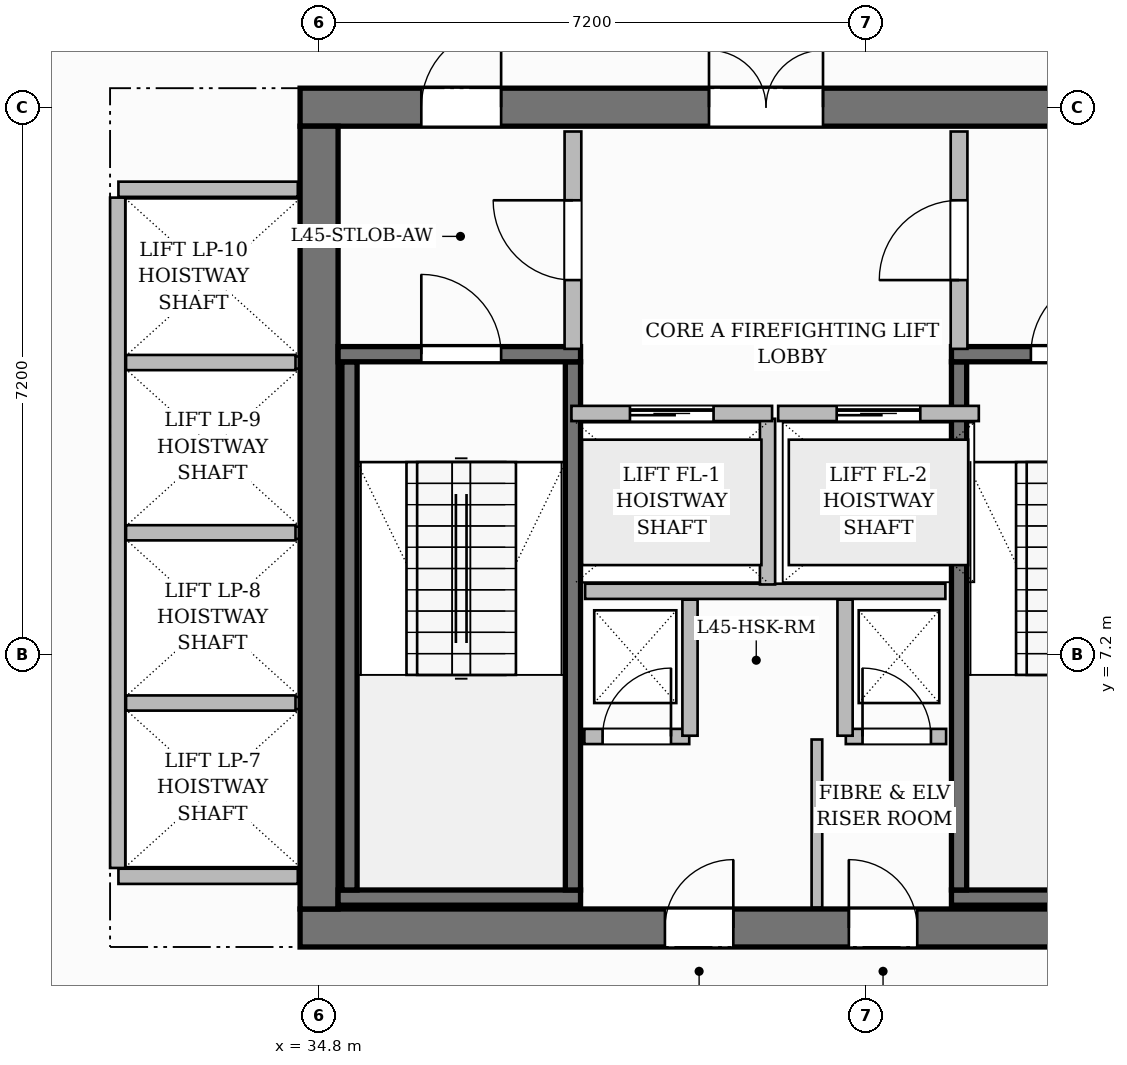
"""IFC4 building model, lengths in metres.
Left out: names, types, materials, properties, quantities, classifications, styles, units other than length and angle.
Written with IfcOpenShell. Run it as: python <this file> out.ifc"""

import sys

from ifc_helpers import new_model, si_unit, direction, frame, frame_2d, origin, place, context, subcontext, project, spatial, rectangle, extrude, source, transform, mapped, element, fill, save


model = new_model("IFC4")
c1 = context("Model", 3, precision=1e-05, world=origin(), true_north=direction((0.0, 1.0)))
c2 = subcontext(c1, "Body", "Model", "MODEL_VIEW")
j1 = project(units=[si_unit("LENGTHUNIT", "METRE"), si_unit("PLANEANGLEUNIT", "RADIAN")], contexts=[c1])
p1 = place(None, origin())
s1 = spatial("IfcSite", under=j1, at=p1, CompositionType="ELEMENT")
p2 = place(p1, origin())
s2 = spatial("IfcBuilding", under=s1, at=p2, CompositionType="ELEMENT")
p3 = place(p2, frame((0.0, 0.0, 181.1)))
s3 = spatial("IfcBuildingStorey", under=s2, at=p3, CompositionType="ELEMENT", Elevation=181.1)
p4 = place(p3, frame((34.55, 3.6, 0.0), z_axis=(0.0, 0.0, 1.0), x_axis=(1.0, 0.0, 0.0)))
e1 = element("IfcWall", 1, at=p4, inside=s3, PredefinedType="SHEAR", context=c2, shape_type="SweptSolid", body=[
    extrude(rectangle(XDim=15.5, YDim=0.5, at=frame_2d((7.75, 0.0))), origin(), (0.0, 0.0, 1.0), 3.85),
])
p5 = place(p4, frame((4.8, 0.0, 0.0)))
e2 = element("IfcOpeningElement", 2, at=p5, cuts=e1, PredefinedType="OPENING", context=c2, shape_type="SweptSolid", body=[
    extrude(rectangle(XDim=0.9, YDim=2.1, at=frame_2d((0.45, 1.05))), frame((0.0, 0.26, 0.0), z_axis=(0.0, -1.0, 0.0), x_axis=(1.0, 0.0, 0.0)), (0.0, 0.0, 1.0), 0.52),
])
p6 = place(p4, frame((7.22, 0.0, 0.0)))
e3 = element("IfcOpeningElement", 3, at=p6, cuts=e1, PredefinedType="OPENING", context=c2, shape_type="SweptSolid", body=[
    extrude(rectangle(XDim=0.9, YDim=2.1, at=frame_2d((0.45, 1.05))), frame((0.0, 0.26, 0.0), z_axis=(0.0, -1.0, 0.0), x_axis=(1.0, 0.0, 0.0)), (0.0, 0.0, 1.0), 0.52),
])
p7 = place(p3, frame((34.55, 14.4, 0.0), z_axis=(0.0, 0.0, 1.0), x_axis=(1.0, 0.0, 0.0)))
e4 = element("IfcWall", 4, at=p7, inside=s3, PredefinedType="SHEAR", context=c2, shape_type="SweptSolid", body=[
    extrude(rectangle(XDim=15.5, YDim=0.5, at=frame_2d((7.75, 0.0))), origin(), (0.0, 0.0, 1.0), 3.85),
])
p8 = place(p7, frame((5.38, 0.0, 0.0)))
e5 = element("IfcOpeningElement", 5, at=p8, cuts=e4, PredefinedType="OPENING", context=c2, shape_type="SweptSolid", body=[
    extrude(rectangle(XDim=1.5, YDim=2.2, at=frame_2d((0.75, 1.1))), frame((0.0, 0.26, 0.0), z_axis=(0.0, -1.0, 0.0), x_axis=(1.0, 0.0, 0.0)), (0.0, 0.0, 1.0), 0.52),
])
p9 = place(p7, frame((1.595, 0.0, 0.0)))
e6 = element("IfcOpeningElement", 6, at=p9, cuts=e4, PredefinedType="OPENING", context=c2, shape_type="SweptSolid", body=[
    extrude(rectangle(XDim=1.05, YDim=2.15, at=frame_2d((0.525, 1.075))), frame((0.0, 0.26, 0.0), z_axis=(0.0, -1.0, 0.0), x_axis=(1.0, 0.0, 0.0)), (0.0, 0.0, 1.0), 0.52),
])
p10 = place(p7, frame((11.225, 0.0, 0.0)))
e7 = element("IfcOpeningElement", 7, at=p10, cuts=e4, PredefinedType="OPENING", context=c2, shape_type="SweptSolid", body=[
    extrude(rectangle(XDim=1.05, YDim=2.15, at=frame_2d((0.525, 1.075))), frame((0.0, 0.26, 0.0), z_axis=(0.0, -1.0, 0.0), x_axis=(1.0, 0.0, 0.0)), (0.0, 0.0, 1.0), 0.52),
])
p11 = place(p3, frame((34.8, 3.85, 0.0), z_axis=(0.0, 0.0, 1.0), x_axis=(0.0, 1.0, 0.0)))
e8 = element("IfcWall", 8, at=p11, inside=s3, PredefinedType="SHEAR", context=c2, shape_type="SweptSolid", body=[
    extrude(rectangle(XDim=10.3, YDim=0.5, at=frame_2d((5.15, 0.0))), origin(), (0.0, 0.0, 1.0), 3.85),
])
p12 = place(p3, frame((35.05, 4.0, 0.0), z_axis=(0.0, 0.0, 1.0), x_axis=(1.0, 0.0, 0.0)))
e9 = element("IfcWall", 9, at=p12, inside=s3, PredefinedType="SHEAR", context=c2, shape_type="SweptSolid", body=[
    extrude(rectangle(XDim=3.19, YDim=0.2, at=frame_2d((1.595, 0.0))), origin(), (0.0, 0.0, 1.0), 3.85),
])
for number, where, z_axis, x_axis in (
    (10, (35.2, 4.1, 0.0), (0.0, 0.0, 1.0), (0.0, 1.0, 0.0)),
    (11, (38.14, 4.1, 0.0), (0.0, 0.0, 1.0), (0.0, 1.0, 0.0)),
):
    element("IfcWall", number, at=place(p3, frame(where, z_axis=z_axis, x_axis=x_axis)), inside=s3, PredefinedType="SHEAR", context=c2, shape_type="SweptSolid", body=[
        extrude(rectangle(XDim=6.95, YDim=0.2, at=frame_2d((3.475, 0.0))), origin(), (0.0, 0.0, 1.0), 3.85),
    ])
p13 = place(p3, frame((35.05, 11.15, 0.0), z_axis=(0.0, 0.0, 1.0), x_axis=(1.0, 0.0, 0.0)))
e12 = element("IfcWall", 12, at=p13, inside=s3, PredefinedType="SHEAR", context=c2, shape_type="SweptSolid", body=[
    extrude(rectangle(XDim=3.19, YDim=0.2, at=frame_2d((1.595, 0.0))), origin(), (0.0, 0.0, 1.0), 3.85),
])
p14 = place(p13, frame((1.095, 0.0, 0.0)))
e13 = element("IfcOpeningElement", 13, at=p14, cuts=e12, PredefinedType="OPENING", context=c2, shape_type="SweptSolid", body=[
    extrude(rectangle(XDim=1.05, YDim=2.2, at=frame_2d((0.525, 1.1))), frame((0.0, 0.11, 0.0), z_axis=(0.0, -1.0, 0.0), x_axis=(1.0, 0.0, 0.0)), (0.0, 0.0, 1.0), 0.22),
])
p15 = place(p3, frame((43.12, 4.0, 0.0), z_axis=(0.0, 0.0, 1.0), x_axis=(1.0, 0.0, 0.0)))
e14 = element("IfcWall", 14, at=p15, inside=s3, PredefinedType="SHEAR", context=c2, shape_type="SweptSolid", body=[
    extrude(rectangle(XDim=6.43, YDim=0.2, at=frame_2d((3.215, 0.0))), origin(), (0.0, 0.0, 1.0), 3.85),
])
p16 = place(p3, frame((43.22, 4.1, 0.0), z_axis=(0.0, 0.0, 1.0), x_axis=(0.0, 1.0, 0.0)))
e15 = element("IfcWall", 15, at=p16, inside=s3, PredefinedType="SHEAR", context=c2, shape_type="SweptSolid", body=[
    extrude(rectangle(XDim=6.95, YDim=0.2, at=frame_2d((3.475, 0.0))), origin(), (0.0, 0.0, 1.0), 3.85),
])
p17 = place(p3, frame((43.12, 11.15, 0.0), z_axis=(0.0, 0.0, 1.0), x_axis=(1.0, 0.0, 0.0)))
e16 = element("IfcWall", 16, at=p17, inside=s3, PredefinedType="SHEAR", context=c2, shape_type="SweptSolid", body=[
    extrude(rectangle(XDim=6.43, YDim=0.2, at=frame_2d((3.215, 0.0))), origin(), (0.0, 0.0, 1.0), 3.85),
])
p18 = place(p17, frame((1.045, 0.0, 0.0)))
e17 = element("IfcOpeningElement", 17, at=p18, cuts=e16, PredefinedType="OPENING", context=c2, shape_type="SweptSolid", body=[
    extrude(rectangle(XDim=1.05, YDim=2.2, at=frame_2d((0.525, 1.1))), frame((0.0, 0.11, 0.0), z_axis=(0.0, -1.0, 0.0), x_axis=(1.0, 0.0, 0.0)), (0.0, 0.0, 1.0), 0.22),
])
p19 = place(p17, frame((4.125, 0.0, 0.0)))
e18 = element("IfcOpeningElement", 18, at=p19, cuts=e16, PredefinedType="OPENING", context=c2, shape_type="SweptSolid", body=[
    extrude(rectangle(XDim=1.05, YDim=2.2, at=frame_2d((0.525, 1.1))), frame((0.0, 0.11, 0.0), z_axis=(0.0, -1.0, 0.0), x_axis=(1.0, 0.0, 0.0)), (0.0, 0.0, 1.0), 0.22),
])
p20 = place(p3, frame((38.3, 8.03, 0.0), z_axis=(0.0, 0.0, 1.0), x_axis=(1.0, 0.0, 0.0)))
e19 = element("IfcWall", 19, at=p20, inside=s3, PredefinedType="PARTITIONING", context=c2, shape_type="SweptSolid", body=[
    extrude(rectangle(XDim=4.74, YDim=0.2, at=frame_2d((2.37, 0.0))), origin(), (0.0, 0.0, 1.0), 3.6),
])
p21 = place(p3, frame((40.7, 8.12, 0.0), z_axis=(0.0, 0.0, 1.0), x_axis=(0.0, 1.0, 0.0)))
e20 = element("IfcWall", 20, at=p21, inside=s3, PredefinedType="PARTITIONING", context=c2, shape_type="SweptSolid", body=[
    extrude(rectangle(XDim=2.18, YDim=0.2, at=frame_2d((1.09, 0.0))), origin(), (0.0, 0.0, 1.0), 3.6),
])
p22 = place(p3, frame((38.14, 11.22, 0.0), z_axis=(0.0, 0.0, 1.0), x_axis=(0.0, 1.0, 0.0)))
e21 = element("IfcWall", 21, at=p22, inside=s3, PredefinedType="PARTITIONING", context=c2, shape_type="SweptSolid", body=[
    extrude(rectangle(XDim=2.86, YDim=0.22, at=frame_2d((1.43, 0.0))), origin(), (0.0, 0.0, 1.0), 3.6),
])
p23 = place(p22, frame((0.905, 0.0, 0.0)))
e22 = element("IfcOpeningElement", 22, at=p23, cuts=e21, PredefinedType="OPENING", context=c2, shape_type="SweptSolid", body=[
    extrude(rectangle(XDim=1.05, YDim=2.15, at=frame_2d((0.525, 1.075))), frame((0.0, 0.12, 0.0), z_axis=(0.0, -1.0, 0.0), x_axis=(1.0, 0.0, 0.0)), (0.0, 0.0, 1.0), 0.24),
])
p24 = place(p3, frame((43.22, 11.22, 0.0), z_axis=(0.0, 0.0, 1.0), x_axis=(0.0, 1.0, 0.0)))
e23 = element("IfcWall", 23, at=p24, inside=s3, PredefinedType="PARTITIONING", context=c2, shape_type="SweptSolid", body=[
    extrude(rectangle(XDim=2.86, YDim=0.22, at=frame_2d((1.43, 0.0))), origin(), (0.0, 0.0, 1.0), 3.6),
])
p25 = place(p24, frame((0.905, 0.0, 0.0)))
e24 = element("IfcOpeningElement", 24, at=p25, cuts=e23, PredefinedType="OPENING", context=c2, shape_type="SweptSolid", body=[
    extrude(rectangle(XDim=1.05, YDim=2.15, at=frame_2d((0.525, 1.075))), frame((0.0, 0.12, 0.0), z_axis=(0.0, -1.0, 0.0), x_axis=(1.0, 0.0, 0.0)), (0.0, 0.0, 1.0), 0.24),
])
p26 = place(p3, frame((38.29, 6.12, 0.0), z_axis=(0.0, 0.0, 1.0), x_axis=(1.0, 0.0, 0.0)))
e25 = element("IfcWall", 25, at=p26, inside=s3, PredefinedType="PARTITIONING", context=c2, shape_type="SweptSolid", body=[
    extrude(rectangle(XDim=1.38, YDim=0.2, at=frame_2d((0.69, 0.0))), origin(), (0.0, 0.0, 1.0), 3.6),
])
p27 = place(p26, frame((0.24, 0.0, 0.0)))
e26 = element("IfcOpeningElement", 26, at=p27, cuts=e25, PredefinedType="OPENING", context=c2, shape_type="SweptSolid", body=[
    extrude(rectangle(XDim=0.9, YDim=2.1, at=frame_2d((0.45, 1.05))), frame((0.0, 0.11, 0.0), z_axis=(0.0, -1.0, 0.0), x_axis=(1.0, 0.0, 0.0)), (0.0, 0.0, 1.0), 0.22),
])
p28 = place(p3, frame((39.68, 6.13, 0.0), z_axis=(0.0, 0.0, 1.0), x_axis=(0.0, 1.0, 0.0)))
e27 = element("IfcWall", 27, at=p28, inside=s3, PredefinedType="PARTITIONING", context=c2, shape_type="SweptSolid", body=[
    extrude(rectangle(XDim=1.79, YDim=0.2, at=frame_2d((0.895, 0.0))), origin(), (0.0, 0.0, 1.0), 3.6),
])
p29 = place(p3, frame((41.73, 6.12, 0.0), z_axis=(0.0, 0.0, 1.0), x_axis=(1.0, 0.0, 0.0)))
e28 = element("IfcWall", 28, at=p29, inside=s3, PredefinedType="PARTITIONING", context=c2, shape_type="SweptSolid", body=[
    extrude(rectangle(XDim=1.32, YDim=0.2, at=frame_2d((0.66, 0.0))), origin(), (0.0, 0.0, 1.0), 3.6),
])
p30 = place(p29, frame((0.22, 0.0, 0.0)))
e29 = element("IfcOpeningElement", 29, at=p30, cuts=e28, PredefinedType="OPENING", context=c2, shape_type="SweptSolid", body=[
    extrude(rectangle(XDim=0.9, YDim=2.1, at=frame_2d((0.45, 1.05))), frame((0.0, 0.11, 0.0), z_axis=(0.0, -1.0, 0.0), x_axis=(1.0, 0.0, 0.0)), (0.0, 0.0, 1.0), 0.22),
])
p31 = place(p3, frame((41.72, 6.13, 0.0), z_axis=(0.0, 0.0, 1.0), x_axis=(0.0, 1.0, 0.0)))
e30 = element("IfcWall", 30, at=p31, inside=s3, PredefinedType="PARTITIONING", context=c2, shape_type="SweptSolid", body=[
    extrude(rectangle(XDim=1.79, YDim=0.2, at=frame_2d((0.895, 0.0))), origin(), (0.0, 0.0, 1.0), 3.6),
])
p32 = place(p3, frame((41.35, 3.87, 0.0), z_axis=(0.0, 0.0, 1.0), x_axis=(0.0, 1.0, 0.0)))
e31 = element("IfcWall", 31, at=p32, inside=s3, PredefinedType="PARTITIONING", context=c2, shape_type="SweptSolid", body=[
    extrude(rectangle(XDim=2.21, YDim=0.14, at=frame_2d((1.105, 0.0))), origin(), (0.0, 0.0, 1.0), 3.6),
])
for number, where, z_axis, x_axis in (
    (32, (32.16, 4.28, 0.0), (0.0, 0.0, 1.0), (1.0, 0.0, 0.0)),
    (33, (32.16, 13.32, 0.0), (0.0, 0.0, 1.0), (1.0, 0.0, 0.0)),
):
    element("IfcWall", number, at=place(p3, frame(where, z_axis=z_axis, x_axis=x_axis)), inside=s3, PredefinedType="PARTITIONING", context=c2, shape_type="SweptSolid", body=[
        extrude(rectangle(XDim=2.36, YDim=0.2, at=frame_2d((1.18, 0.0))), origin(), (0.0, 0.0, 1.0), 3.6),
    ])
p33 = place(p3, frame((32.15, 4.39, 0.0), z_axis=(0.0, 0.0, 1.0), x_axis=(0.0, 1.0, 0.0)))
e34 = element("IfcWall", 34, at=p33, inside=s3, PredefinedType="PARTITIONING", context=c2, shape_type="SweptSolid", body=[
    extrude(rectangle(XDim=8.82, YDim=0.2, at=frame_2d((4.41, 0.0))), origin(), (0.0, 0.0, 1.0), 3.6),
])
for number, where, z_axis, x_axis in (
    (35, (32.26, 6.56, 0.0), (0.0, 0.0, 1.0), (1.0, 0.0, 0.0)),
    (36, (32.26, 8.8, 0.0), (0.0, 0.0, 1.0), (1.0, 0.0, 0.0)),
    (37, (32.26, 11.04, 0.0), (0.0, 0.0, 1.0), (1.0, 0.0, 0.0)),
):
    element("IfcWall", number, at=place(p3, frame(where, z_axis=z_axis, x_axis=x_axis)), inside=s3, PredefinedType="PARTITIONING", context=c2, shape_type="SweptSolid", body=[
        extrude(rectangle(XDim=2.23, YDim=0.2, at=frame_2d((1.115, 0.0))), origin(), (0.0, 0.0, 1.0), 3.6),
    ])
p34 = place(p3, frame((38.12, 10.37, 0.0), z_axis=(0.0, 0.0, 1.0), x_axis=(1.0, 0.0, 0.0)))
e38 = element("IfcWall", 38, at=p34, inside=s3, PredefinedType="PARTITIONING", context=c2, shape_type="SweptSolid", body=[
    extrude(rectangle(XDim=2.64, YDim=0.2, at=frame_2d((1.32, 0.0))), origin(), (0.0, 0.0, 1.0), 3.6),
])
p35 = place(p34, frame((0.77, 0.0, 0.0)))
e39 = element("IfcOpeningElement", 39, at=p35, cuts=e38, PredefinedType="OPENING", context=c2, shape_type="SweptSolid", body=[
    extrude(rectangle(XDim=1.1, YDim=2.2, at=frame_2d((0.55, 1.1))), frame((0.0, 0.11, 0.0), z_axis=(0.0, -1.0, 0.0), x_axis=(1.0, 0.0, 0.0)), (0.0, 0.0, 1.0), 0.22),
])
p36 = place(p3, frame((40.84, 10.37, 0.0), z_axis=(0.0, 0.0, 1.0), x_axis=(1.0, 0.0, 0.0)))
e40 = element("IfcWall", 40, at=p36, inside=s3, PredefinedType="PARTITIONING", context=c2, shape_type="SweptSolid", body=[
    extrude(rectangle(XDim=2.64, YDim=0.2, at=frame_2d((1.32, 0.0))), origin(), (0.0, 0.0, 1.0), 3.6),
])
p37 = place(p36, frame((0.77, 0.0, 0.0)))
e41 = element("IfcOpeningElement", 41, at=p37, cuts=e40, PredefinedType="OPENING", context=c2, shape_type="SweptSolid", body=[
    extrude(rectangle(XDim=1.1, YDim=2.2, at=frame_2d((0.55, 1.1))), frame((0.0, 0.11, 0.0), z_axis=(0.0, -1.0, 0.0), x_axis=(1.0, 0.0, 0.0)), (0.0, 0.0, 1.0), 0.22),
])
m1 = source(origin(), c2, "Body", "SweptSolid", [
    extrude(rectangle(XDim=1.05, YDim=2.2, at=frame_2d((0.525, 1.1))), frame((0.0, 0.025, 0.0), z_axis=(0.0, -1.0, 0.0), x_axis=(1.0, 0.0, 0.0)), (0.0, 0.0, 1.0), 0.05),
])
p38 = place(p14, origin())
e42 = element("IfcDoor", 42, at=p38, inside=s3, OperationType="SINGLE_SWING_LEFT", PredefinedType="DOOR", context=c2, shape_type="MappedRepresentation", body=[
    mapped(m1, transform((0.0, 0.0, 0.0), scale=1.0)),
])
fill(e13, e42)
p39 = place(p18, origin())
e43 = element("IfcDoor", 43, at=p39, inside=s3, OperationType="SINGLE_SWING_RIGHT", PredefinedType="DOOR", context=c2, shape_type="MappedRepresentation", body=[
    mapped(m1, transform((0.0, 0.0, 0.0), scale=1.0)),
])
fill(e17, e43)
m2 = source(origin(), c2, "Body", "SweptSolid", [
    extrude(rectangle(XDim=1.05, YDim=2.15, at=frame_2d((0.525, 1.075))), frame((0.0, 0.025, 0.0), z_axis=(0.0, -1.0, 0.0), x_axis=(1.0, 0.0, 0.0)), (0.0, 0.0, 1.0), 0.05),
])
p40 = place(p23, origin())
e44 = element("IfcDoor", 44, at=p40, inside=s3, OperationType="SINGLE_SWING_RIGHT", PredefinedType="DOOR", context=c2, shape_type="MappedRepresentation", body=[
    mapped(m2, transform((0.0, 0.0, 0.0), scale=1.0)),
])
fill(e22, e44)
p41 = place(p25, origin())
e45 = element("IfcDoor", 45, at=p41, inside=s3, OperationType="SINGLE_SWING_LEFT", PredefinedType="DOOR", context=c2, shape_type="MappedRepresentation", body=[
    mapped(m2, transform((0.0, 0.0, 0.0), scale=1.0)),
])
fill(e24, e45)
m3 = source(origin(), c2, "Body", "SweptSolid", [
    extrude(rectangle(XDim=1.5, YDim=2.2, at=frame_2d((0.75, 1.1))), frame((0.0, 0.025, 0.0), z_axis=(0.0, -1.0, 0.0), x_axis=(1.0, 0.0, 0.0)), (0.0, 0.0, 1.0), 0.05),
])
p42 = place(p8, origin())
e46 = element("IfcDoor", 46, at=p42, inside=s3, OperationType="DOUBLE_DOOR_SINGLE_SWING", PredefinedType="DOOR", context=c2, shape_type="MappedRepresentation", body=[
    mapped(m3, transform((0.0, 0.0, 0.0), scale=1.0)),
])
fill(e5, e46)
p43 = place(p9, origin())
e47 = element("IfcDoor", 47, at=p43, inside=s3, OperationType="SINGLE_SWING_RIGHT", PredefinedType="DOOR", context=c2, shape_type="MappedRepresentation", body=[
    mapped(m2, transform((0.0, 0.0, 0.0), scale=1.0)),
])
fill(e6, e47)
m4 = source(origin(), c2, "Body", "SweptSolid", [
    extrude(rectangle(XDim=0.9, YDim=2.1, at=frame_2d((0.45, 1.05))), frame((0.0, 0.025, 0.0), z_axis=(0.0, -1.0, 0.0), x_axis=(1.0, 0.0, 0.0)), (0.0, 0.0, 1.0), 0.05),
])
p44 = place(p27, origin())
e48 = element("IfcDoor", 48, at=p44, inside=s3, OperationType="SINGLE_SWING_RIGHT", PredefinedType="DOOR", context=c2, shape_type="MappedRepresentation", body=[
    mapped(m4, transform((0.0, 0.0, 0.0), scale=1.0)),
])
fill(e26, e48)
p45 = place(p30, origin())
e49 = element("IfcDoor", 49, at=p45, inside=s3, OperationType="SINGLE_SWING_LEFT", PredefinedType="DOOR", context=c2, shape_type="MappedRepresentation", body=[
    mapped(m4, transform((0.0, 0.0, 0.0), scale=1.0)),
])
fill(e29, e49)
p46 = place(p5, origin())
e50 = element("IfcDoor", 50, at=p46, inside=s3, OperationType="SINGLE_SWING_RIGHT", PredefinedType="DOOR", context=c2, shape_type="MappedRepresentation", body=[
    mapped(m4, transform((0.0, 0.0, 0.0), scale=1.0)),
])
fill(e2, e50)
p47 = place(p6, origin())
e51 = element("IfcDoor", 51, at=p47, inside=s3, OperationType="SINGLE_SWING_LEFT", PredefinedType="DOOR", context=c2, shape_type="MappedRepresentation", body=[
    mapped(m4, transform((0.0, 0.0, 0.0), scale=1.0)),
])
fill(e3, e51)
m5 = source(origin(), c2, "Body", "SweptSolid", [
    extrude(rectangle(XDim=1.1, YDim=2.2, at=frame_2d((0.55, 1.1))), frame((0.0, 0.025, 0.0), z_axis=(0.0, -1.0, 0.0), x_axis=(1.0, 0.0, 0.0)), (0.0, 0.0, 1.0), 0.05),
])
p48 = place(p35, origin())
e52 = element("IfcDoor", 52, at=p48, inside=s3, OperationType="SLIDING_TO_LEFT", PredefinedType="DOOR", context=c2, shape_type="MappedRepresentation", body=[
    mapped(m5, transform((0.0, 0.0, 0.0), scale=1.0)),
])
fill(e39, e52)
p49 = place(p37, origin())
e53 = element("IfcDoor", 53, at=p49, inside=s3, OperationType="SLIDING_TO_LEFT", PredefinedType="DOOR", context=c2, shape_type="MappedRepresentation", body=[
    mapped(m5, transform((0.0, 0.0, 0.0), scale=1.0)),
])
fill(e41, e53)
save(model, sys.argv[1])
